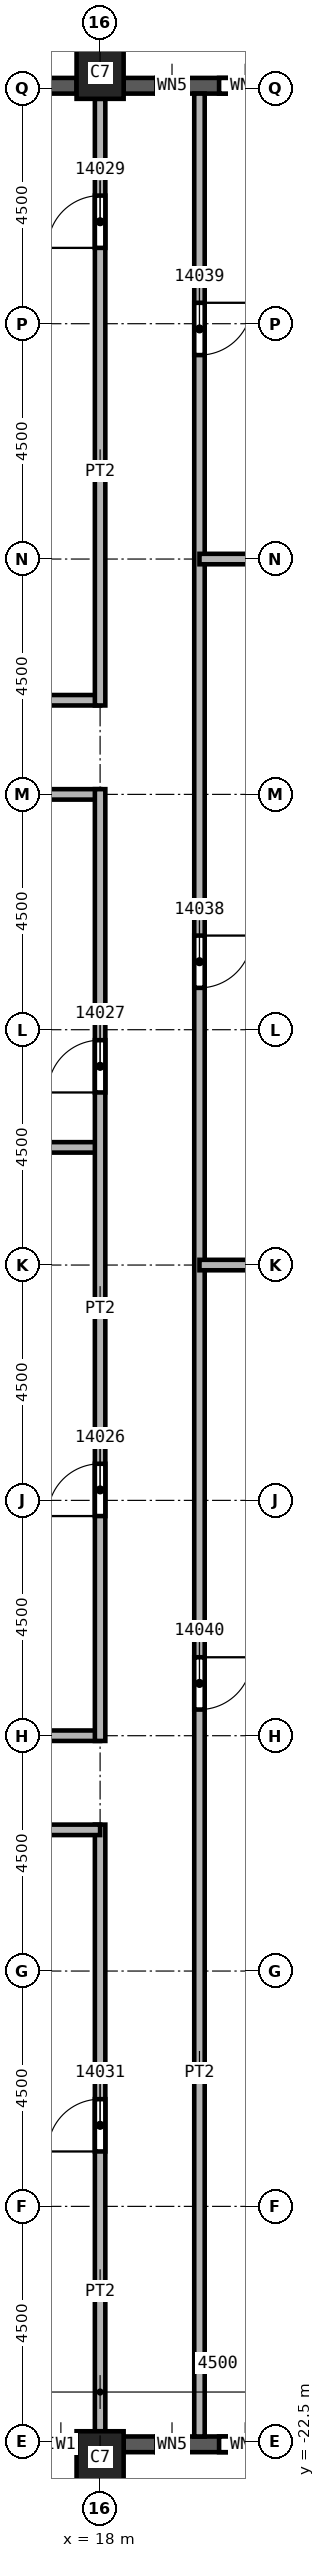
"""IFC4 building model, lengths in metres.
Left out: names, types, materials, properties, quantities, classifications, styles, units other than length and angle.
Written with IfcOpenShell. Run it as: python <this file> out.ifc"""

import sys

from ifc_helpers import new_model, si_unit, direction, frame, frame_2d, origin, origin_2d, place, context, subcontext, project, spatial, rectangle, extrude, element, fill, save


model = new_model("IFC4")
c1 = context("Model", 3, precision=1e-05, world=origin(), true_north=direction((0.0, 1.0)))
c2 = subcontext(c1, "Body", "Model", "MODEL_VIEW")
j1 = project(units=[si_unit("LENGTHUNIT", "METRE"), si_unit("PLANEANGLEUNIT", "RADIAN")], contexts=[c1])
p1 = place(None, origin())
s1 = spatial("IfcSite", under=j1, at=p1, CompositionType="ELEMENT")
p2 = place(p1, origin())
s2 = spatial("IfcBuilding", under=s1, at=p2, CompositionType="ELEMENT")
p3 = place(p2, frame((0.0, 0.0, 220.0)))
s3 = spatial("IfcBuildingStorey", under=s2, at=p3, CompositionType="ELEMENT", Elevation=220.0)
for number, where, z_axis, x_axis in (
    (1, (18.0, 22.8, 0.0), (0.0, 0.0, 1.0), (1.0, 0.0, 0.0)),
    (2, (18.0, -22.8, 0.0), (0.0, 0.0, 1.0), (1.0, 0.0, 0.0)),
):
    element("IfcColumn", number, at=place(p3, frame(where, z_axis=z_axis, x_axis=x_axis)), inside=s3, PredefinedType="COLUMN", context=c2, shape_type="SweptSolid", body=[
        extrude(rectangle(XDim=0.9, YDim=1.0, at=origin_2d()), origin(), (0.0, 0.0, 1.0), 3.72),
    ])
p4 = place(p3, frame((13.95, -22.55, 0.0), z_axis=(0.0, 0.0, 1.0), x_axis=(1.0, 0.0, 0.0)))
e3 = element("IfcWall", 3, at=p4, inside=s3, PredefinedType="SOLIDWALL", context=c2, shape_type="SweptSolid", body=[
    extrude(rectangle(XDim=3.6, YDim=0.3, at=frame_2d((1.8, 0.0))), origin(), (0.0, 0.0, 1.0), 3.12),
])
p5 = place(p4, frame((0.6, 0.0, 0.8)))
e4 = element("IfcOpeningElement", 4, at=p5, cuts=e3, PredefinedType="OPENING", context=c2, shape_type="SweptSolid", body=[
    extrude(rectangle(XDim=2.4, YDim=1.95, at=frame_2d((1.2, 0.975))), frame((0.0, 0.15, 0.0), z_axis=(0.0, -1.0, 0.0), x_axis=(1.0, 0.0, 0.0)), (0.0, 0.0, 1.0), 0.3),
])
p6 = place(p3, frame((18.45, -22.55, 0.0), z_axis=(0.0, 0.0, 1.0), x_axis=(1.0, 0.0, 0.0)))
e5 = element("IfcWall", 5, at=p6, inside=s3, PredefinedType="SOLIDWALL", context=c2, shape_type="SweptSolid", body=[
    extrude(rectangle(XDim=3.6, YDim=0.3, at=frame_2d((1.8, 0.0))), origin(), (0.0, 0.0, 1.0), 3.12),
])
p7 = place(p6, frame((0.625, 0.0, 0.8)))
e6 = element("IfcOpeningElement", 6, at=p7, cuts=e5, PredefinedType="OPENING", context=c2, shape_type="SweptSolid", body=[
    extrude(rectangle(XDim=0.6, YDim=1.95, at=frame_2d((0.3, 0.975))), frame((0.0, 0.15, 0.0), z_axis=(0.0, -1.0, 0.0), x_axis=(1.0, 0.0, 0.0)), (0.0, 0.0, 1.0), 0.3),
])
p8 = place(p6, frame((1.825, 0.0, 0.8)))
e7 = element("IfcOpeningElement", 7, at=p8, cuts=e5, PredefinedType="OPENING", context=c2, shape_type="SweptSolid", body=[
    extrude(rectangle(XDim=1.0, YDim=1.95, at=frame_2d((0.5, 0.975))), frame((0.0, 0.15, 0.0), z_axis=(0.0, -1.0, 0.0), x_axis=(1.0, 0.0, 0.0)), (0.0, 0.0, 1.0), 0.3),
])
p9 = place(p3, frame((22.05, 22.55, 0.0), z_axis=(0.0, 0.0, 1.0), x_axis=(-1.0, 0.0, 0.0)))
e8 = element("IfcWall", 8, at=p9, inside=s3, PredefinedType="SOLIDWALL", context=c2, shape_type="SweptSolid", body=[
    extrude(rectangle(XDim=3.6, YDim=0.3, at=frame_2d((1.8, 0.0))), origin(), (0.0, 0.0, 1.0), 3.12),
])
p10 = place(p9, frame((0.775, 0.0, 0.8)))
e9 = element("IfcOpeningElement", 9, at=p10, cuts=e8, PredefinedType="OPENING", context=c2, shape_type="SweptSolid", body=[
    extrude(rectangle(XDim=1.0, YDim=1.95, at=frame_2d((0.5, 0.975))), frame((0.0, 0.15, 0.0), z_axis=(0.0, -1.0, 0.0), x_axis=(1.0, 0.0, 0.0)), (0.0, 0.0, 1.0), 0.3),
])
p11 = place(p9, frame((2.375, 0.0, 0.8)))
e10 = element("IfcOpeningElement", 10, at=p11, cuts=e8, PredefinedType="OPENING", context=c2, shape_type="SweptSolid", body=[
    extrude(rectangle(XDim=0.6, YDim=1.95, at=frame_2d((0.3, 0.975))), frame((0.0, 0.15, 0.0), z_axis=(0.0, -1.0, 0.0), x_axis=(1.0, 0.0, 0.0)), (0.0, 0.0, 1.0), 0.3),
])
p12 = place(p3, frame((17.55, 22.55, 0.0), z_axis=(0.0, 0.0, 1.0), x_axis=(-1.0, 0.0, 0.0)))
e11 = element("IfcWall", 11, at=p12, inside=s3, PredefinedType="SOLIDWALL", context=c2, shape_type="SweptSolid", body=[
    extrude(rectangle(XDim=3.6, YDim=0.3, at=frame_2d((1.8, 0.0))), origin(), (0.0, 0.0, 1.0), 3.12),
])
p13 = place(p12, frame((0.6, 0.0, 0.8)))
e12 = element("IfcOpeningElement", 12, at=p13, cuts=e11, PredefinedType="OPENING", context=c2, shape_type="SweptSolid", body=[
    extrude(rectangle(XDim=2.4, YDim=1.95, at=frame_2d((1.2, 0.975))), frame((0.0, 0.15, 0.0), z_axis=(0.0, -1.0, 0.0), x_axis=(1.0, 0.0, 0.0)), (0.0, 0.0, 1.0), 0.3),
])
for number, where, z_axis, x_axis in (
    (13, (13.5, -9.0, 0.0), (0.0, 0.0, 1.0), (1.0, 0.0, 0.0)),
    (14, (13.5, 2.25, 0.0), (0.0, 0.0, 1.0), (1.0, 0.0, 0.0)),
    (15, (18.0, 9.0, 0.0), (0.0, 0.0, 1.0), (-1.0, 0.0, 0.0)),
):
    element("IfcWall", number, at=place(p3, frame(where, z_axis=z_axis, x_axis=x_axis)), inside=s3, PredefinedType="PARTITIONING", context=c2, shape_type="SweptSolid", body=[
        extrude(rectangle(XDim=4.5, YDim=0.2, at=frame_2d((2.25, 0.0))), origin(), (0.0, 0.0, 1.0), 3.72),
    ])
p14 = place(p3, frame((14.4, 10.8, 0.0), z_axis=(0.0, 0.0, 1.0), x_axis=(1.0, 0.0, 0.0)))
e16 = element("IfcWall", 16, at=p14, inside=s3, PredefinedType="PARTITIONING", context=c2, shape_type="SweptSolid", body=[
    extrude(rectangle(XDim=3.6, YDim=0.2, at=frame_2d((1.8, 0.0))), origin(), (0.0, 0.0, 1.0), 3.72),
])
p15 = place(p3, frame((18.0, -22.3, 0.0), z_axis=(0.0, 0.0, 1.0), x_axis=(0.0, 1.0, 0.0)))
e17 = element("IfcWall", 17, at=p15, inside=s3, PredefinedType="PARTITIONING", context=c2, shape_type="SweptSolid", body=[
    extrude(rectangle(XDim=11.6, YDim=0.2, at=frame_2d((5.8, 0.0))), origin(), (0.0, 0.0, 1.0), 3.72),
])
p16 = place(p15, frame((5.35, 0.0, 0.0)))
e18 = element("IfcOpeningElement", 18, at=p16, cuts=e17, PredefinedType="OPENING", context=c2, shape_type="SweptSolid", body=[
    extrude(rectangle(XDim=1.0, YDim=2.1, at=frame_2d((0.5, 1.05))), frame((0.0, 0.1, 0.0), z_axis=(0.0, -1.0, 0.0), x_axis=(1.0, 0.0, 0.0)), (0.0, 0.0, 1.0), 0.2),
])
p17 = place(p3, frame((18.0, -10.8, 0.0), z_axis=(0.0, 0.0, 1.0), x_axis=(-1.0, 0.0, 0.0)))
e19 = element("IfcWall", 19, at=p17, inside=s3, PredefinedType="PARTITIONING", context=c2, shape_type="SweptSolid", body=[
    extrude(rectangle(XDim=3.6, YDim=0.2, at=frame_2d((1.8, 0.0))), origin(), (0.0, 0.0, 1.0), 3.72),
])
p18 = place(p3, frame((18.0, -9.1, 0.0), z_axis=(0.0, 0.0, 1.0), x_axis=(0.0, 1.0, 0.0)))
e20 = element("IfcWall", 20, at=p18, inside=s3, PredefinedType="PARTITIONING", context=c2, shape_type="SweptSolid", body=[
    extrude(rectangle(XDim=18.2, YDim=0.2, at=frame_2d((9.1, 0.0))), origin(), (0.0, 0.0, 1.0), 3.72),
])
p19 = place(p18, frame((4.3, 0.0, 0.0)))
e21 = element("IfcOpeningElement", 21, at=p19, cuts=e20, PredefinedType="OPENING", context=c2, shape_type="SweptSolid", body=[
    extrude(rectangle(XDim=1.0, YDim=2.1, at=frame_2d((0.5, 1.05))), frame((0.0, 0.1, 0.0), z_axis=(0.0, -1.0, 0.0), x_axis=(1.0, 0.0, 0.0)), (0.0, 0.0, 1.0), 0.2),
])
p20 = place(p18, frame((12.4, 0.0, 0.0)))
e22 = element("IfcOpeningElement", 22, at=p20, cuts=e20, PredefinedType="OPENING", context=c2, shape_type="SweptSolid", body=[
    extrude(rectangle(XDim=1.0, YDim=2.1, at=frame_2d((0.5, 1.05))), frame((0.0, 0.1, 0.0), z_axis=(0.0, -1.0, 0.0), x_axis=(1.0, 0.0, 0.0)), (0.0, 0.0, 1.0), 0.2),
])
p21 = place(p3, frame((18.0, 10.7, 0.0), z_axis=(0.0, 0.0, 1.0), x_axis=(0.0, 1.0, 0.0)))
e23 = element("IfcWall", 23, at=p21, inside=s3, PredefinedType="PARTITIONING", context=c2, shape_type="SweptSolid", body=[
    extrude(rectangle(XDim=11.6, YDim=0.2, at=frame_2d((5.8, 0.0))), origin(), (0.0, 0.0, 1.0), 3.72),
])
p22 = place(p21, frame((8.75, 0.0, 0.0)))
e24 = element("IfcOpeningElement", 24, at=p22, cuts=e23, PredefinedType="OPENING", context=c2, shape_type="SweptSolid", body=[
    extrude(rectangle(XDim=1.0, YDim=2.1, at=frame_2d((0.5, 1.05))), frame((0.0, 0.1, 0.0), z_axis=(0.0, -1.0, 0.0), x_axis=(1.0, 0.0, 0.0)), (0.0, 0.0, 1.0), 0.2),
])
p23 = place(p3, frame((19.9, 22.4, 0.0), z_axis=(0.0, 0.0, 1.0), x_axis=(0.0, -1.0, 0.0)))
e25 = element("IfcWall", 25, at=p23, inside=s3, PredefinedType="PARTITIONING", context=c2, shape_type="SweptSolid", body=[
    extrude(rectangle(XDim=44.8, YDim=0.2, at=frame_2d((22.4, 0.0))), origin(), (0.0, 0.0, 1.0), 3.72),
])
p24 = place(p23, frame((16.1, 0.0, 0.0)))
e26 = element("IfcOpeningElement", 26, at=p24, cuts=e25, PredefinedType="OPENING", context=c2, shape_type="SweptSolid", body=[
    extrude(rectangle(XDim=1.0, YDim=2.1, at=frame_2d((0.5, 1.05))), frame((0.0, 0.1, 0.0), z_axis=(0.0, -1.0, 0.0), x_axis=(1.0, 0.0, 0.0)), (0.0, 0.0, 1.0), 0.2),
])
p25 = place(p23, frame((4.0, 0.0, 0.0)))
e27 = element("IfcOpeningElement", 27, at=p25, cuts=e25, PredefinedType="OPENING", context=c2, shape_type="SweptSolid", body=[
    extrude(rectangle(XDim=1.0, YDim=2.1, at=frame_2d((0.5, 1.05))), frame((0.0, 0.1, 0.0), z_axis=(0.0, -1.0, 0.0), x_axis=(1.0, 0.0, 0.0)), (0.0, 0.0, 1.0), 0.2),
])
p26 = place(p23, frame((29.9, 0.0, 0.0)))
e28 = element("IfcOpeningElement", 28, at=p26, cuts=e25, PredefinedType="OPENING", context=c2, shape_type="SweptSolid", body=[
    extrude(rectangle(XDim=1.0, YDim=2.1, at=frame_2d((0.5, 1.05))), frame((0.0, 0.1, 0.0), z_axis=(0.0, -1.0, 0.0), x_axis=(1.0, 0.0, 0.0)), (0.0, 0.0, 1.0), 0.2),
])
p27 = place(p3, frame((19.9, 13.5, 0.0), z_axis=(0.0, 0.0, 1.0), x_axis=(1.0, 0.0, 0.0)))
e29 = element("IfcWall", 29, at=p27, inside=s3, PredefinedType="PARTITIONING", context=c2, shape_type="SweptSolid", body=[
    extrude(rectangle(XDim=6.7, YDim=0.2, at=frame_2d((3.35, 0.0))), origin(), (0.0, 0.0, 1.0), 3.72),
])
p28 = place(p3, frame((26.5, 0.0, 0.0), z_axis=(0.0, 0.0, 1.0), x_axis=(-1.0, 0.0, 0.0)))
e30 = element("IfcWall", 30, at=p28, inside=s3, PredefinedType="PARTITIONING", context=c2, shape_type="SweptSolid", body=[
    extrude(rectangle(XDim=6.6, YDim=0.2, at=frame_2d((3.3, 0.0))), origin(), (0.0, 0.0, 1.0), 3.72),
])
p29 = place(p19, origin())
e31 = element("IfcDoor", 31, at=p29, inside=s3, OperationType="SINGLE_SWING_LEFT", PredefinedType="DOOR", context=c2, shape_type="SweptSolid", body=[
    extrude(rectangle(XDim=1.0, YDim=2.1, at=frame_2d((0.5, 1.05))), frame((0.0, 0.025, 0.0), z_axis=(0.0, -1.0, 0.0), x_axis=(1.0, 0.0, 0.0)), (0.0, 0.0, 1.0), 0.05),
])
fill(e21, e31)
p30 = place(p20, origin())
e32 = element("IfcDoor", 32, at=p30, inside=s3, OperationType="SINGLE_SWING_RIGHT", PredefinedType="DOOR", context=c2, shape_type="SweptSolid", body=[
    extrude(rectangle(XDim=1.0, YDim=2.1, at=frame_2d((0.5, 1.05))), frame((0.0, 0.025, 0.0), z_axis=(0.0, -1.0, 0.0), x_axis=(1.0, 0.0, 0.0)), (0.0, 0.0, 1.0), 0.05),
])
fill(e22, e32)
p31 = place(p22, origin())
e33 = element("IfcDoor", 33, at=p31, inside=s3, OperationType="SINGLE_SWING_RIGHT", PredefinedType="DOOR", context=c2, shape_type="SweptSolid", body=[
    extrude(rectangle(XDim=1.0, YDim=2.1, at=frame_2d((0.5, 1.05))), frame((0.0, 0.025, 0.0), z_axis=(0.0, -1.0, 0.0), x_axis=(1.0, 0.0, 0.0)), (0.0, 0.0, 1.0), 0.05),
])
fill(e24, e33)
p32 = place(p16, origin())
e34 = element("IfcDoor", 34, at=p32, inside=s3, OperationType="SINGLE_SWING_RIGHT", PredefinedType="DOOR", context=c2, shape_type="SweptSolid", body=[
    extrude(rectangle(XDim=1.0, YDim=2.1, at=frame_2d((0.5, 1.05))), frame((0.0, 0.025, 0.0), z_axis=(0.0, -1.0, 0.0), x_axis=(1.0, 0.0, 0.0)), (0.0, 0.0, 1.0), 0.05),
])
fill(e18, e34)
p33 = place(p24, origin())
e35 = element("IfcDoor", 35, at=p33, inside=s3, OperationType="SINGLE_SWING_LEFT", PredefinedType="DOOR", context=c2, shape_type="SweptSolid", body=[
    extrude(rectangle(XDim=1.0, YDim=2.1, at=frame_2d((0.5, 1.05))), frame((0.0, 0.025, 0.0), z_axis=(0.0, -1.0, 0.0), x_axis=(1.0, 0.0, 0.0)), (0.0, 0.0, 1.0), 0.05),
])
fill(e26, e35)
p34 = place(p25, origin())
e36 = element("IfcDoor", 36, at=p34, inside=s3, OperationType="SINGLE_SWING_RIGHT", PredefinedType="DOOR", context=c2, shape_type="SweptSolid", body=[
    extrude(rectangle(XDim=1.0, YDim=2.1, at=frame_2d((0.5, 1.05))), frame((0.0, 0.025, 0.0), z_axis=(0.0, -1.0, 0.0), x_axis=(1.0, 0.0, 0.0)), (0.0, 0.0, 1.0), 0.05),
])
fill(e27, e36)
p35 = place(p26, origin())
e37 = element("IfcDoor", 37, at=p35, inside=s3, OperationType="SINGLE_SWING_LEFT", PredefinedType="DOOR", context=c2, shape_type="SweptSolid", body=[
    extrude(rectangle(XDim=1.0, YDim=2.1, at=frame_2d((0.5, 1.05))), frame((0.0, 0.025, 0.0), z_axis=(0.0, -1.0, 0.0), x_axis=(1.0, 0.0, 0.0)), (0.0, 0.0, 1.0), 0.05),
])
fill(e28, e37)
p36 = place(p7, origin())
e38 = element("IfcWindow", 38, at=p36, inside=s3, PartitioningType="SINGLE_PANEL", PredefinedType="WINDOW", context=c2, shape_type="SweptSolid", body=[
    extrude(rectangle(XDim=0.6, YDim=1.95, at=frame_2d((0.3, 0.975))), frame((0.0, 0.03, 0.0), z_axis=(0.0, -1.0, 0.0), x_axis=(1.0, 0.0, 0.0)), (0.0, 0.0, 1.0), 0.06),
])
fill(e6, e38)
p37 = place(p8, origin())
e39 = element("IfcWindow", 39, at=p37, inside=s3, PartitioningType="SINGLE_PANEL", PredefinedType="WINDOW", context=c2, shape_type="SweptSolid", body=[
    extrude(rectangle(XDim=1.0, YDim=1.95, at=frame_2d((0.5, 0.975))), frame((0.0, 0.03, 0.0), z_axis=(0.0, -1.0, 0.0), x_axis=(1.0, 0.0, 0.0)), (0.0, 0.0, 1.0), 0.06),
])
fill(e7, e39)
p38 = place(p10, origin())
e40 = element("IfcWindow", 40, at=p38, inside=s3, PartitioningType="SINGLE_PANEL", PredefinedType="WINDOW", context=c2, shape_type="SweptSolid", body=[
    extrude(rectangle(XDim=1.0, YDim=1.95, at=frame_2d((0.5, 0.975))), frame((0.0, 0.03, 0.0), z_axis=(0.0, -1.0, 0.0), x_axis=(1.0, 0.0, 0.0)), (0.0, 0.0, 1.0), 0.06),
])
fill(e9, e40)
p39 = place(p11, origin())
e41 = element("IfcWindow", 41, at=p39, inside=s3, PartitioningType="SINGLE_PANEL", PredefinedType="WINDOW", context=c2, shape_type="SweptSolid", body=[
    extrude(rectangle(XDim=0.6, YDim=1.95, at=frame_2d((0.3, 0.975))), frame((0.0, 0.03, 0.0), z_axis=(0.0, -1.0, 0.0), x_axis=(1.0, 0.0, 0.0)), (0.0, 0.0, 1.0), 0.06),
])
fill(e10, e41)
save(model, sys.argv[1])
